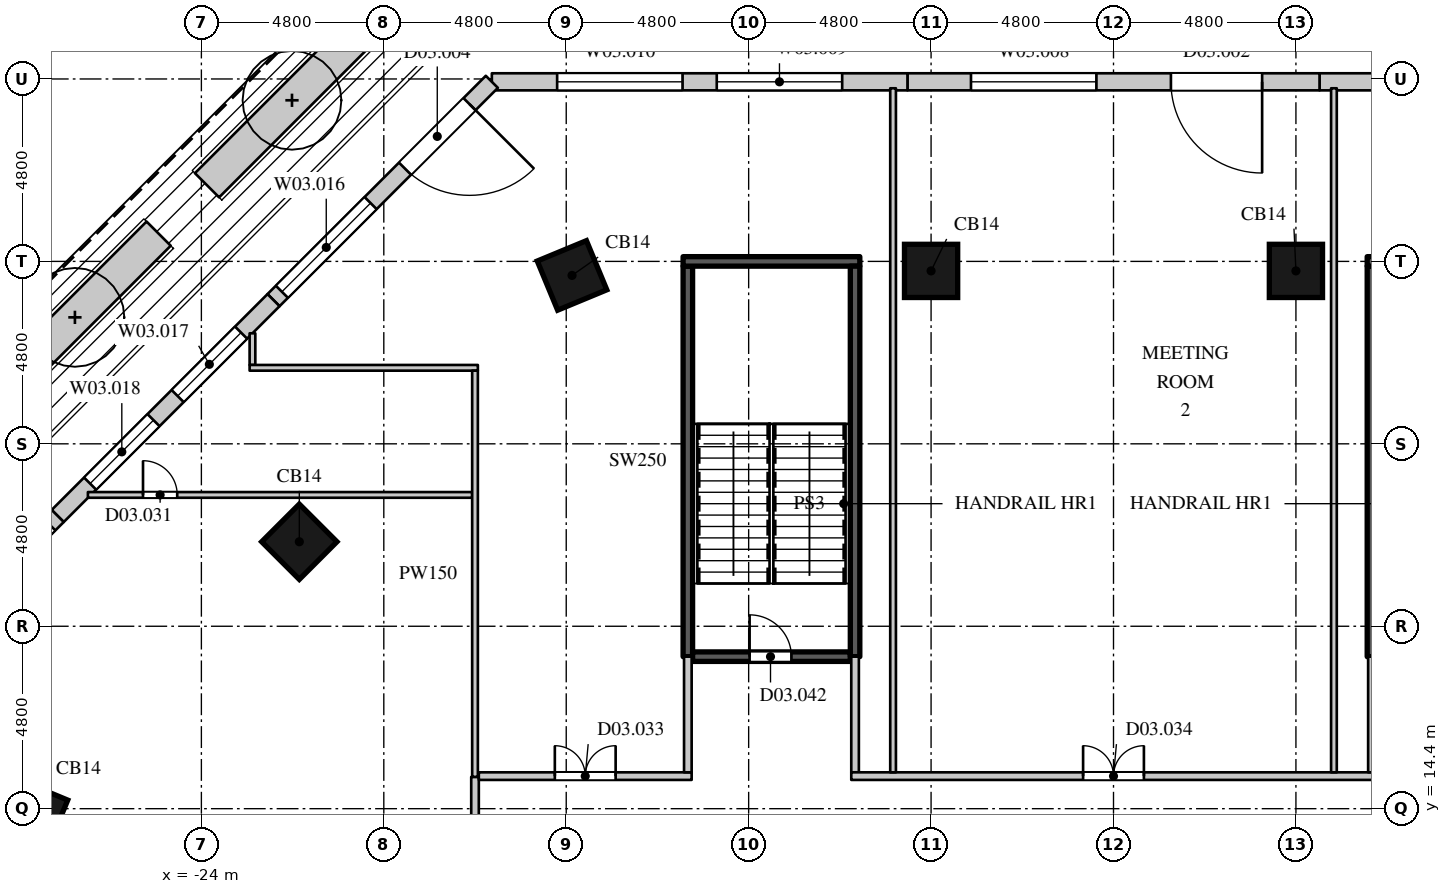
"""IFC4 building model, lengths in metres.
Left out: names, types, materials, properties, quantities, classifications, styles, units other than length and angle.
Written with IfcOpenShell. Run it as: python <this file> out.ifc"""

import sys

from ifc_helpers import new_model, si_unit, direction, frame, frame_2d, origin, origin_2d, place, context, subcontext, project, spatial, rectangle, extrude, element, fill, save


model = new_model("IFC4")
c1 = context("Model", 3, precision=1e-05, world=origin(), true_north=direction((0.0, 1.0)))
c2 = subcontext(c1, "Body", "Model", "MODEL_VIEW")
j1 = project(units=[si_unit("LENGTHUNIT", "METRE"), si_unit("PLANEANGLEUNIT", "RADIAN")], contexts=[c1])
p1 = place(None, origin())
s1 = spatial("IfcSite", under=j1, at=p1, CompositionType="ELEMENT")
p2 = place(p1, origin())
s2 = spatial("IfcBuilding", under=s1, at=p2, CompositionType="ELEMENT")
p3 = place(p2, frame((0.0, 0.0, 16.0)))
s3 = spatial("IfcBuildingStorey", under=s2, at=p3, CompositionType="ELEMENT", Elevation=16.0)
for number, where, z_axis, x_axis in (
    (1, (-28.431, 14.247, 0.0), (0.0, 0.0, 1.0), (-0.383, -0.924, 0.0)),
    (2, (-21.423, 21.423, 0.0), (0.0, 0.0, 1.0), (-0.707, -0.707, 0.0)),
    (3, (-14.247, 28.431, 0.0), (0.0, 0.0, 1.0), (-0.924, -0.383, 0.0)),
    (4, (-4.8, 28.55, 0.0), (0.0, 0.0, 1.0), (-1.0, 0.0, 0.0)),
    (5, (4.8, 28.55, 0.0), (0.0, 0.0, 1.0), (-1.0, 0.0, 0.0)),
):
    element("IfcColumn", number, at=place(p3, frame(where, z_axis=z_axis, x_axis=x_axis)), inside=s3, PredefinedType="COLUMN", context=c2, shape_type="SweptSolid", body=[
        extrude(rectangle(XDim=1.4, YDim=1.4, at=origin_2d()), origin(), (0.0, 0.0, 1.0), 5.0),
    ])
p4 = place(p3, frame((16.357, 33.525, 0.0), z_axis=(0.0, 0.0, 1.0), x_axis=(-1.0, 0.0, 0.0)))
e6 = element("IfcWall", 6, at=p4, inside=s3, PredefinedType="ELEMENTEDWALL", context=c2, shape_type="SweptSolid", body=[
    extrude(rectangle(XDim=10.936, YDim=0.45, at=frame_2d((5.468, 0.0))), origin(), (0.0, 0.0, 1.0), 4.7),
])
p5 = place(p4, frame((1.718, 0.0, 1.05)))
e7 = element("IfcOpeningElement", 7, at=p5, cuts=e6, PredefinedType="OPENING", context=c2, shape_type="SweptSolid", body=[
    extrude(rectangle(XDim=3.3, YDim=2.7, at=frame_2d((1.65, 1.35))), frame((0.0, 0.235, 0.0), z_axis=(0.0, -1.0, 0.0), x_axis=(1.0, 0.0, 0.0)), (0.0, 0.0, 1.0), 0.47),
])
p6 = place(p4, frame((5.918, 0.0, 1.05)))
e8 = element("IfcOpeningElement", 8, at=p6, cuts=e6, PredefinedType="OPENING", context=c2, shape_type="SweptSolid", body=[
    extrude(rectangle(XDim=3.3, YDim=2.7, at=frame_2d((1.65, 1.35))), frame((0.0, 0.235, 0.0), z_axis=(0.0, -1.0, 0.0), x_axis=(1.0, 0.0, 0.0)), (0.0, 0.0, 1.0), 0.47),
])
p7 = place(p3, frame((5.421, 33.525, 0.0), z_axis=(0.0, 0.0, 1.0), x_axis=(-1.0, 0.0, 0.0)))
e9 = element("IfcWall", 9, at=p7, inside=s3, PredefinedType="ELEMENTEDWALL", context=c2, shape_type="SweptSolid", body=[
    extrude(rectangle(XDim=10.843, YDim=0.45, at=frame_2d((5.421, 0.0))), origin(), (0.0, 0.0, 1.0), 4.7),
])
p8 = place(p7, frame((1.511, 0.0, 0.0)))
e10 = element("IfcOpeningElement", 10, at=p8, cuts=e9, PredefinedType="OPENING", context=c2, shape_type="SweptSolid", body=[
    extrude(rectangle(XDim=2.4, YDim=2.7, at=frame_2d((1.2, 1.35))), frame((0.0, 0.235, 0.0), z_axis=(0.0, -1.0, 0.0), x_axis=(1.0, 0.0, 0.0)), (0.0, 0.0, 1.0), 0.47),
])
p9 = place(p7, frame((5.871, 0.0, 1.05)))
e11 = element("IfcOpeningElement", 11, at=p9, cuts=e9, PredefinedType="OPENING", context=c2, shape_type="SweptSolid", body=[
    extrude(rectangle(XDim=3.3, YDim=2.7, at=frame_2d((1.65, 1.35))), frame((0.0, 0.235, 0.0), z_axis=(0.0, -1.0, 0.0), x_axis=(1.0, 0.0, 0.0)), (0.0, 0.0, 1.0), 0.47),
])
p10 = place(p3, frame((-5.421, 33.525, 0.0), z_axis=(0.0, 0.0, 1.0), x_axis=(-1.0, 0.0, 0.0)))
e12 = element("IfcWall", 12, at=p10, inside=s3, PredefinedType="ELEMENTEDWALL", context=c2, shape_type="SweptSolid", body=[
    extrude(rectangle(XDim=10.936, YDim=0.45, at=frame_2d((5.468, 0.0))), origin(), (0.0, 0.0, 1.0), 4.7),
])
p11 = place(p10, frame((1.718, 0.0, 1.05)))
e13 = element("IfcOpeningElement", 13, at=p11, cuts=e12, PredefinedType="OPENING", context=c2, shape_type="SweptSolid", body=[
    extrude(rectangle(XDim=3.3, YDim=2.7, at=frame_2d((1.65, 1.35))), frame((0.0, 0.235, 0.0), z_axis=(0.0, -1.0, 0.0), x_axis=(1.0, 0.0, 0.0)), (0.0, 0.0, 1.0), 0.47),
])
p12 = place(p10, frame((5.918, 0.0, 1.05)))
e14 = element("IfcOpeningElement", 14, at=p12, cuts=e12, PredefinedType="OPENING", context=c2, shape_type="SweptSolid", body=[
    extrude(rectangle(XDim=3.3, YDim=2.7, at=frame_2d((1.65, 1.35))), frame((0.0, 0.235, 0.0), z_axis=(0.0, -1.0, 0.0), x_axis=(1.0, 0.0, 0.0)), (0.0, 0.0, 1.0), 0.47),
])
p13 = place(p3, frame((-16.357, 33.525, 0.0), z_axis=(0.0, 0.0, 1.0), x_axis=(-0.70712180699, -0.707091755064, 0.0)))
e15 = element("IfcWall", 15, at=p13, inside=s3, PredefinedType="ELEMENTEDWALL", context=c2, shape_type="SweptSolid", body=[
    extrude(rectangle(XDim=8.124, YDim=0.45, at=frame_2d((4.062, 0.0))), origin(), (0.0, 0.0, 1.0), 4.7),
])
p14 = place(p13, frame((0.831, 0.0, 0.0)))
e16 = element("IfcOpeningElement", 16, at=p14, cuts=e15, PredefinedType="OPENING", context=c2, shape_type="SweptSolid", body=[
    extrude(rectangle(XDim=2.4, YDim=2.7, at=frame_2d((1.2, 1.35))), frame((0.0, 0.235, 0.0), z_axis=(0.0, -1.0, 0.0), x_axis=(1.0, 0.0, 0.0)), (0.0, 0.0, 1.0), 0.47),
])
p15 = place(p13, frame((4.512, 0.0, 1.05)))
e17 = element("IfcOpeningElement", 17, at=p15, cuts=e15, PredefinedType="OPENING", context=c2, shape_type="SweptSolid", body=[
    extrude(rectangle(XDim=3.3, YDim=2.7, at=frame_2d((1.65, 1.35))), frame((0.0, 0.235, 0.0), z_axis=(0.0, -1.0, 0.0), x_axis=(1.0, 0.0, 0.0)), (0.0, 0.0, 1.0), 0.47),
])
p16 = place(p3, frame((-22.102, 27.781, 0.0), z_axis=(0.0, 0.0, 1.0), x_axis=(-0.707106781187, -0.707106781187, 0.0)))
e18 = element("IfcWall", 18, at=p16, inside=s3, PredefinedType="ELEMENTEDWALL", context=c2, shape_type="SweptSolid", body=[
    extrude(rectangle(XDim=8.031, YDim=0.45, at=frame_2d((4.016, 0.0))), origin(), (0.0, 0.0, 1.0), 4.7),
])
p17 = place(p16, frame((1.208, 0.0, 1.05)))
e19 = element("IfcOpeningElement", 19, at=p17, cuts=e18, PredefinedType="OPENING", context=c2, shape_type="SweptSolid", body=[
    extrude(rectangle(XDim=2.36, YDim=2.7, at=frame_2d((1.18, 1.35))), frame((0.0, 0.235, 0.0), z_axis=(0.0, -1.0, 0.0), x_axis=(1.0, 0.0, 0.0)), (0.0, 0.0, 1.0), 0.47),
])
p18 = place(p16, frame((4.465, 0.0, 1.05)))
e20 = element("IfcOpeningElement", 20, at=p18, cuts=e18, PredefinedType="OPENING", context=c2, shape_type="SweptSolid", body=[
    extrude(rectangle(XDim=2.36, YDim=2.7, at=frame_2d((1.18, 1.35))), frame((0.0, 0.235, 0.0), z_axis=(0.0, -1.0, 0.0), x_axis=(1.0, 0.0, 0.0)), (0.0, 0.0, 1.0), 0.47),
])
p19 = place(p3, frame((-27.781, 22.102, 0.0), z_axis=(0.0, 0.0, 1.0), x_axis=(-0.707091755064, -0.70712180699, 0.0)))
e21 = element("IfcWall", 21, at=p19, inside=s3, PredefinedType="ELEMENTEDWALL", context=c2, shape_type="SweptSolid", body=[
    extrude(rectangle(XDim=8.124, YDim=0.45, at=frame_2d((4.062, 0.0))), origin(), (0.0, 0.0, 1.0), 4.7),
])
p20 = place(p19, frame((0.312, 0.0, 1.05)))
e22 = element("IfcOpeningElement", 22, at=p20, cuts=e21, PredefinedType="OPENING", context=c2, shape_type="SweptSolid", body=[
    extrude(rectangle(XDim=3.3, YDim=2.7, at=frame_2d((1.65, 1.35))), frame((0.0, 0.235, 0.0), z_axis=(0.0, -1.0, 0.0), x_axis=(1.0, 0.0, 0.0)), (0.0, 0.0, 1.0), 0.47),
])
p21 = place(p19, frame((4.512, 0.0, 1.05)))
e23 = element("IfcOpeningElement", 23, at=p21, cuts=e21, PredefinedType="OPENING", context=c2, shape_type="SweptSolid", body=[
    extrude(rectangle(XDim=3.3, YDim=2.7, at=frame_2d((1.65, 1.35))), frame((0.0, 0.235, 0.0), z_axis=(0.0, -1.0, 0.0), x_axis=(1.0, 0.0, 0.0)), (0.0, 0.0, 1.0), 0.47),
])
p22 = place(p3, frame((-19.38, 35.275, 0.0), z_axis=(0.0, 0.0, 1.0), x_axis=(-0.70708747847, -0.707126083377, 0.0)))
e24 = element("IfcWall", 24, at=p22, inside=s3, PredefinedType="USERDEFINED", context=c2, shape_type="SweptSolid", body=[
    extrude(rectangle(XDim=6.324, YDim=0.9, at=frame_2d((3.162, 0.0))), origin(), (0.0, 0.0, 1.0), 0.9),
])
p23 = place(p3, frame((-25.125, 29.531, 0.0), z_axis=(0.0, 0.0, 1.0), x_axis=(-0.707106781187, -0.707106781187, 0.0)))
e25 = element("IfcWall", 25, at=p23, inside=s3, PredefinedType="USERDEFINED", context=c2, shape_type="SweptSolid", body=[
    extrude(rectangle(XDim=6.231, YDim=0.9, at=frame_2d((3.115, 0.0))), origin(), (0.0, 0.0, 1.0), 0.9),
])
p24 = place(p3, frame((-16.8, 11.3, 0.0), z_axis=(0.0, 0.0, 1.0), x_axis=(0.0, 1.0, 0.0)))
e26 = element("IfcWall", 26, at=p24, inside=s3, PredefinedType="PARTITIONING", context=c2, shape_type="SweptSolid", body=[
    extrude(rectangle(XDim=3.937, YDim=0.2, at=frame_2d((1.968, 0.0))), origin(), (0.0, 0.0, 1.0), 4.4),
])
p25 = place(p3, frame((-16.7, 15.257, 0.0), z_axis=(0.0, 0.0, 1.0), x_axis=(1.0, 0.0, 0.0)))
e27 = element("IfcWall", 27, at=p25, inside=s3, PredefinedType="PARTITIONING", context=c2, shape_type="SweptSolid", body=[
    extrude(rectangle(XDim=5.6, YDim=0.2, at=frame_2d((2.8, 0.0))), origin(), (0.0, 0.0, 1.0), 4.4),
])
p26 = place(p25, frame((2.0, 0.0, 0.0)))
e28 = element("IfcOpeningElement", 28, at=p26, cuts=e27, PredefinedType="OPENING", context=c2, shape_type="SweptSolid", body=[
    extrude(rectangle(XDim=1.6, YDim=2.4, at=frame_2d((0.8, 1.2))), frame((0.0, 0.11, 0.0), z_axis=(0.0, -1.0, 0.0), x_axis=(1.0, 0.0, 0.0)), (0.0, 0.0, 1.0), 0.22),
])
for number, where, z_axis, x_axis in (
    (29, (-11.2, 15.357, 0.0), (0.0, 0.0, 1.0), (0.0, 1.0, 0.0)),
    (30, (-6.8, 15.357, 0.0), (0.0, 0.0, 1.0), (0.0, 1.0, 0.0)),
):
    element("IfcWall", number, at=place(p3, frame(where, z_axis=z_axis, x_axis=x_axis)), inside=s3, PredefinedType="PARTITIONING", context=c2, shape_type="SweptSolid", body=[
        extrude(rectangle(XDim=3.043, YDim=0.2, at=frame_2d((1.521, 0.0))), origin(), (0.0, 0.0, 1.0), 4.4),
    ])
p27 = place(p3, frame((-6.9, 15.257, 0.0), z_axis=(0.0, 0.0, 1.0), x_axis=(1.0, 0.0, 0.0)))
e31 = element("IfcWall", 31, at=p27, inside=s3, PredefinedType="PARTITIONING", context=c2, shape_type="SweptSolid", body=[
    extrude(rectangle(XDim=13.8, YDim=0.2, at=frame_2d((6.9, 0.0))), origin(), (0.0, 0.0, 1.0), 4.4),
])
p28 = place(p27, frame((6.1, 0.0, 0.0)))
e32 = element("IfcOpeningElement", 32, at=p28, cuts=e31, PredefinedType="OPENING", context=c2, shape_type="SweptSolid", body=[
    extrude(rectangle(XDim=1.6, YDim=2.4, at=frame_2d((0.8, 1.2))), frame((0.0, 0.11, 0.0), z_axis=(0.0, -1.0, 0.0), x_axis=(1.0, 0.0, 0.0)), (0.0, 0.0, 1.0), 0.22),
])
p29 = place(p3, frame((6.8, 15.357, 0.0), z_axis=(0.0, 0.0, 1.0), x_axis=(0.0, 1.0, 0.0)))
e33 = element("IfcWall", 33, at=p29, inside=s3, PredefinedType="PARTITIONING", context=c2, shape_type="SweptSolid", body=[
    extrude(rectangle(XDim=3.043, YDim=0.2, at=frame_2d((1.521, 0.0))), origin(), (0.0, 0.0, 1.0), 4.4),
])
p30 = place(p3, frame((-26.986, 22.656, 0.0), z_axis=(0.0, 0.0, 1.0), x_axis=(1.0, 0.0, 0.0)))
e34 = element("IfcWall", 34, at=p30, inside=s3, PredefinedType="PARTITIONING", context=c2, shape_type="SweptSolid", body=[
    extrude(rectangle(XDim=10.111, YDim=0.15, at=frame_2d((5.055, 0.0))), origin(), (0.0, 0.0, 1.0), 4.4),
])
p31 = place(p30, frame((1.45, 0.0, 0.0)))
e35 = element("IfcOpeningElement", 35, at=p31, cuts=e34, PredefinedType="OPENING", context=c2, shape_type="SweptSolid", body=[
    extrude(rectangle(XDim=0.9, YDim=2.2, at=frame_2d((0.45, 1.1))), frame((0.0, 0.085, 0.0), z_axis=(0.0, -1.0, 0.0), x_axis=(1.0, 0.0, 0.0)), (0.0, 0.0, 1.0), 0.17),
])
p32 = place(p3, frame((-22.656, 26.075, 0.0), z_axis=(0.0, 0.0, 1.0), x_axis=(0.0, 1.0, 0.0)))
e36 = element("IfcWall", 36, at=p32, inside=s3, PredefinedType="PARTITIONING", context=c2, shape_type="SweptSolid", body=[
    extrude(rectangle(XDim=0.833, YDim=0.15, at=frame_2d((0.417, 0.0))), origin(), (0.0, 0.0, 1.0), 4.4),
])
p33 = place(p3, frame((-22.731, 26.0, 0.0), z_axis=(0.0, 0.0, 1.0), x_axis=(1.0, 0.0, 0.0)))
e37 = element("IfcWall", 37, at=p33, inside=s3, PredefinedType="PARTITIONING", context=c2, shape_type="SweptSolid", body=[
    extrude(rectangle(XDim=6.006, YDim=0.15, at=frame_2d((3.003, 0.0))), origin(), (0.0, 0.0, 1.0), 4.4),
])
p34 = place(p3, frame((-16.8, 15.237, 0.0), z_axis=(0.0, 0.0, 1.0), x_axis=(0.0, 1.0, 0.0)))
e38 = element("IfcWall", 38, at=p34, inside=s3, PredefinedType="PARTITIONING", context=c2, shape_type="SweptSolid", body=[
    extrude(rectangle(XDim=10.688, YDim=0.15, at=frame_2d((5.344, 0.0))), origin(), (0.0, 0.0, 1.0), 4.4),
])
for number, where, z_axis, x_axis in (
    (39, (-5.8, 15.357, 0.0), (0.0, 0.0, 1.0), (0.0, 1.0, 0.0)),
    (40, (5.8, 15.357, 0.0), (0.0, 0.0, 1.0), (0.0, 1.0, 0.0)),
):
    element("IfcWall", number, at=place(p3, frame(where, z_axis=z_axis, x_axis=x_axis)), inside=s3, PredefinedType="PARTITIONING", context=c2, shape_type="SweptSolid", body=[
        extrude(rectangle(XDim=17.998, YDim=0.15, at=frame_2d((8.999, 0.0))), origin(), (0.0, 0.0, 1.0), 4.4),
    ])
p35 = place(p3, frame((-11.2, 18.4, 0.0), z_axis=(0.0, 0.0, 1.0), x_axis=(0.0, 1.0, 0.0)))
e41 = element("IfcWall", 41, at=p35, inside=s3, PredefinedType="SHEAR", context=c2, shape_type="SweptSolid", body=[
    extrude(rectangle(XDim=10.275, YDim=0.25, at=frame_2d((5.138, 0.0))), origin(), (0.0, 0.0, 1.0), 4.65),
])
p36 = place(p3, frame((-11.075, 18.4, 0.0), z_axis=(0.0, 0.0, 1.0), x_axis=(1.0, 0.0, 0.0)))
e42 = element("IfcWall", 42, at=p36, inside=s3, PredefinedType="SHEAR", context=c2, shape_type="SweptSolid", body=[
    extrude(rectangle(XDim=4.15, YDim=0.25, at=frame_2d((2.075, 0.0))), origin(), (0.0, 0.0, 1.0), 4.65),
])
p37 = place(p36, frame((1.5, 0.0, 0.0)))
e43 = element("IfcOpeningElement", 43, at=p37, cuts=e42, PredefinedType="OPENING", context=c2, shape_type="SweptSolid", body=[
    extrude(rectangle(XDim=1.1, YDim=2.2, at=frame_2d((0.55, 1.1))), frame((0.0, 0.135, 0.0), z_axis=(0.0, -1.0, 0.0), x_axis=(1.0, 0.0, 0.0)), (0.0, 0.0, 1.0), 0.27),
])
p38 = place(p3, frame((-11.325, 28.8, 0.0), z_axis=(0.0, 0.0, 1.0), x_axis=(1.0, 0.0, 0.0)))
e44 = element("IfcWall", 44, at=p38, inside=s3, PredefinedType="SHEAR", context=c2, shape_type="SweptSolid", body=[
    extrude(rectangle(XDim=4.65, YDim=0.25, at=frame_2d((2.325, 0.0))), origin(), (0.0, 0.0, 1.0), 4.65),
])
for number, where, z_axis, x_axis in (
    (45, (-6.8, 18.4, 0.0), (0.0, 0.0, 1.0), (0.0, 1.0, 0.0)),
    (46, (6.8, 18.4, 0.0), (0.0, 0.0, 1.0), (0.0, 1.0, 0.0)),
):
    element("IfcWall", number, at=place(p3, frame(where, z_axis=z_axis, x_axis=x_axis)), inside=s3, PredefinedType="SHEAR", context=c2, shape_type="SweptSolid", body=[
        extrude(rectangle(XDim=10.275, YDim=0.25, at=frame_2d((5.138, 0.0))), origin(), (0.0, 0.0, 1.0), 4.65),
    ])
p39 = place(p3, frame((6.675, 28.8, 0.0), z_axis=(0.0, 0.0, 1.0), x_axis=(1.0, 0.0, 0.0)))
e47 = element("IfcWall", 47, at=p39, inside=s3, PredefinedType="SHEAR", context=c2, shape_type="SweptSolid", body=[
    extrude(rectangle(XDim=4.65, YDim=0.25, at=frame_2d((2.325, 0.0))), origin(), (0.0, 0.0, 1.0), 4.65),
])
p40 = place(p8, origin())
e48 = element("IfcDoor", 48, at=p40, inside=s3, OperationType="SINGLE_SWING_LEFT", PredefinedType="DOOR", context=c2, shape_type="SweptSolid", body=[
    extrude(rectangle(XDim=2.4, YDim=2.7, at=frame_2d((1.2, 1.35))), frame((0.0, 0.13, 0.0), z_axis=(0.0, -1.0, 0.0), x_axis=(1.0, 0.0, 0.0)), (0.0, 0.0, 1.0), 0.05),
])
fill(e10, e48)
p41 = place(p9, origin())
e49 = element("IfcWindow", 49, at=p41, inside=s3, PartitioningType="SINGLE_PANEL", PredefinedType="WINDOW", context=c2, shape_type="SweptSolid", body=[
    extrude(rectangle(XDim=3.3, YDim=2.7, at=frame_2d((1.65, 1.35))), frame((0.0, 0.135, 0.0), z_axis=(0.0, -1.0, 0.0), x_axis=(1.0, 0.0, 0.0)), (0.0, 0.0, 1.0), 0.06),
])
fill(e11, e49)
p42 = place(p11, origin())
e50 = element("IfcWindow", 50, at=p42, inside=s3, PartitioningType="SINGLE_PANEL", PredefinedType="WINDOW", context=c2, shape_type="SweptSolid", body=[
    extrude(rectangle(XDim=3.3, YDim=2.7, at=frame_2d((1.65, 1.35))), frame((0.0, 0.135, 0.0), z_axis=(0.0, -1.0, 0.0), x_axis=(1.0, 0.0, 0.0)), (0.0, 0.0, 1.0), 0.06),
])
fill(e13, e50)
p43 = place(p12, origin())
e51 = element("IfcWindow", 51, at=p43, inside=s3, PartitioningType="SINGLE_PANEL", PredefinedType="WINDOW", context=c2, shape_type="SweptSolid", body=[
    extrude(rectangle(XDim=3.3, YDim=2.7, at=frame_2d((1.65, 1.35))), frame((0.0, 0.135, 0.0), z_axis=(0.0, -1.0, 0.0), x_axis=(1.0, 0.0, 0.0)), (0.0, 0.0, 1.0), 0.06),
])
fill(e14, e51)
p44 = place(p14, origin())
e52 = element("IfcDoor", 52, at=p44, inside=s3, OperationType="SINGLE_SWING_LEFT", PredefinedType="DOOR", context=c2, shape_type="SweptSolid", body=[
    extrude(rectangle(XDim=2.4, YDim=2.7, at=frame_2d((1.2, 1.35))), frame((0.0, 0.13, 0.0), z_axis=(0.0, -1.0, 0.0), x_axis=(1.0, 0.0, 0.0)), (0.0, 0.0, 1.0), 0.05),
])
fill(e16, e52)
p45 = place(p15, origin())
e53 = element("IfcWindow", 53, at=p45, inside=s3, PartitioningType="SINGLE_PANEL", PredefinedType="WINDOW", context=c2, shape_type="SweptSolid", body=[
    extrude(rectangle(XDim=3.3, YDim=2.7, at=frame_2d((1.65, 1.35))), frame((0.0, 0.135, 0.0), z_axis=(0.0, -1.0, 0.0), x_axis=(1.0, 0.0, 0.0)), (0.0, 0.0, 1.0), 0.06),
])
fill(e17, e53)
p46 = place(p17, origin())
e54 = element("IfcWindow", 54, at=p46, inside=s3, PartitioningType="SINGLE_PANEL", PredefinedType="WINDOW", context=c2, shape_type="SweptSolid", body=[
    extrude(rectangle(XDim=2.36, YDim=2.7, at=frame_2d((1.18, 1.35))), frame((0.0, 0.135, 0.0), z_axis=(0.0, -1.0, 0.0), x_axis=(1.0, 0.0, 0.0)), (0.0, 0.0, 1.0), 0.06),
])
fill(e19, e54)
p47 = place(p18, origin())
e55 = element("IfcWindow", 55, at=p47, inside=s3, PartitioningType="SINGLE_PANEL", PredefinedType="WINDOW", context=c2, shape_type="SweptSolid", body=[
    extrude(rectangle(XDim=2.36, YDim=2.7, at=frame_2d((1.18, 1.35))), frame((0.0, 0.135, 0.0), z_axis=(0.0, -1.0, 0.0), x_axis=(1.0, 0.0, 0.0)), (0.0, 0.0, 1.0), 0.06),
])
fill(e20, e55)
p48 = place(p20, origin())
e56 = element("IfcWindow", 56, at=p48, inside=s3, PartitioningType="SINGLE_PANEL", PredefinedType="WINDOW", context=c2, shape_type="SweptSolid", body=[
    extrude(rectangle(XDim=3.3, YDim=2.7, at=frame_2d((1.65, 1.35))), frame((0.0, 0.135, 0.0), z_axis=(0.0, -1.0, 0.0), x_axis=(1.0, 0.0, 0.0)), (0.0, 0.0, 1.0), 0.06),
])
fill(e22, e56)
p49 = place(p31, origin())
e57 = element("IfcDoor", 57, at=p49, inside=s3, OperationType="SINGLE_SWING_LEFT", PredefinedType="DOOR", context=c2, shape_type="SweptSolid", body=[
    extrude(rectangle(XDim=0.9, YDim=2.2, at=frame_2d((0.45, 1.1))), frame((0.0, 0.025, 0.0), z_axis=(0.0, -1.0, 0.0), x_axis=(1.0, 0.0, 0.0)), (0.0, 0.0, 1.0), 0.05),
])
fill(e35, e57)
p50 = place(p26, origin())
e58 = element("IfcDoor", 58, at=p50, inside=s3, OperationType="DOUBLE_DOOR_SINGLE_SWING", PredefinedType="DOOR", context=c2, shape_type="SweptSolid", body=[
    extrude(rectangle(XDim=1.6, YDim=2.4, at=frame_2d((0.8, 1.2))), frame((0.0, 0.025, 0.0), z_axis=(0.0, -1.0, 0.0), x_axis=(1.0, 0.0, 0.0)), (0.0, 0.0, 1.0), 0.05),
])
fill(e28, e58)
p51 = place(p28, origin())
e59 = element("IfcDoor", 59, at=p51, inside=s3, OperationType="DOUBLE_DOOR_SINGLE_SWING", PredefinedType="DOOR", context=c2, shape_type="SweptSolid", body=[
    extrude(rectangle(XDim=1.6, YDim=2.4, at=frame_2d((0.8, 1.2))), frame((0.0, 0.025, 0.0), z_axis=(0.0, -1.0, 0.0), x_axis=(1.0, 0.0, 0.0)), (0.0, 0.0, 1.0), 0.05),
])
fill(e32, e59)
p52 = place(p37, origin())
e60 = element("IfcDoor", 60, at=p52, inside=s3, OperationType="SINGLE_SWING_LEFT", PredefinedType="DOOR", context=c2, shape_type="SweptSolid", body=[
    extrude(rectangle(XDim=1.1, YDim=2.2, at=frame_2d((0.55, 1.1))), frame((0.0, 0.025, 0.0), z_axis=(0.0, -1.0, 0.0), x_axis=(1.0, 0.0, 0.0)), (0.0, 0.0, 1.0), 0.05),
])
fill(e43, e60)
save(model, sys.argv[1])
